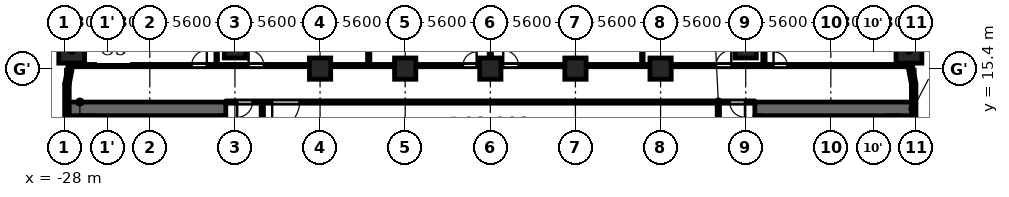
"""IFC4 building model, lengths in metres.
Left out: names, types, materials, properties, quantities, classifications, styles, units other than length and angle.
Written with IfcOpenShell. Run it as: python <this file> out.ifc"""

import sys

from ifc_helpers import new_model, si_unit, direction, frame, frame_2d, origin, origin_2d, place, context, subcontext, project, spatial, rectangle, extrude, element, fill, save


model = new_model("IFC4")
c1 = context("Model", 3, precision=1e-05, world=origin(), true_north=direction((0.0, 1.0)))
c2 = subcontext(c1, "Body", "Model", "MODEL_VIEW")
j1 = project(units=[si_unit("LENGTHUNIT", "METRE"), si_unit("PLANEANGLEUNIT", "RADIAN")], contexts=[c1])
p1 = place(None, origin())
s1 = spatial("IfcSite", under=j1, at=p1, CompositionType="ELEMENT")
p2 = place(p1, origin())
s2 = spatial("IfcBuilding", under=s1, at=p2, CompositionType="ELEMENT")
p3 = place(p2, frame((0.0, 0.0, 11.3)))
s3 = spatial("IfcBuildingStorey", under=s2, at=p3, CompositionType="ELEMENT", Elevation=11.3)
for number, where, z_axis, x_axis in (
    (1, (27.538, 16.609, 0.0), (0.0, 0.0, 1.0), (1.0, 0.0, 0.0)),
    (2, (-27.538, 16.609, 0.0), (0.0, 0.0, 1.0), (1.0, 0.0, 0.0)),
):
    element("IfcColumn", number, at=place(p3, frame(where, z_axis=z_axis, x_axis=x_axis)), inside=s3, PredefinedType="COLUMN", context=c2, shape_type="SweptSolid", body=[
        extrude(rectangle(XDim=1.7, YDim=1.7, at=origin_2d()), origin(), (0.0, 0.0, 1.0), 4.8),
    ])
for number, where, z_axis, x_axis in (
    (3, (-16.8, 16.8, 0.0), (0.0, 0.0, 1.0), (1.0, 0.0, 0.0)),
    (4, (16.8, 16.8, 0.0), (0.0, 0.0, 1.0), (1.0, 0.0, 0.0)),
    (5, (-11.2, 15.4, 0.0), (0.0, 0.0, 1.0), (1.0, 0.0, 0.0)),
    (6, (-5.6, 15.4, 0.0), (0.0, 0.0, 1.0), (1.0, 0.0, 0.0)),
    (7, (0.0, 15.4, 0.0), (0.0, 0.0, 1.0), (1.0, 0.0, 0.0)),
    (8, (5.6, 15.4, 0.0), (0.0, 0.0, 1.0), (1.0, 0.0, 0.0)),
    (9, (11.2, 15.4, 0.0), (0.0, 0.0, 1.0), (1.0, 0.0, 0.0)),
):
    element("IfcColumn", number, at=place(p3, frame(where, z_axis=z_axis, x_axis=x_axis)), inside=s3, PredefinedType="COLUMN", context=c2, shape_type="SweptSolid", body=[
        extrude(rectangle(XDim=1.4, YDim=1.4, at=origin_2d()), origin(), (0.0, 0.0, 1.0), 4.8),
    ])
p4 = place(p3, frame((27.85, 12.05, 0.0), z_axis=(0.0, 0.0, 1.0), x_axis=(0.0, 1.0, 0.0)))
e10 = element("IfcWall", 10, at=p4, inside=s3, PredefinedType="SOLIDWALL", context=c2, shape_type="SweptSolid", body=[
    extrude(rectangle(XDim=2.35, YDim=0.3, at=frame_2d((1.175, 0.0))), origin(), (0.0, 0.0, 1.0), 3.55),
])
for number, where, z_axis, x_axis in (
    (11, (27.853, 14.372, 0.0), (0.0, 0.0, 1.0), (-0.187, 0.982, 0.0)),
    (12, (-27.589, 15.753, 0.0), (0.0, 0.0, 1.0), (-0.187, -0.982, 0.0)),
):
    element("IfcWall", number, at=place(p3, frame(where, z_axis=z_axis, x_axis=x_axis)), inside=s3, PredefinedType="SOLIDWALL", context=c2, shape_type="SweptSolid", body=[
        extrude(rectangle(XDim=1.406, YDim=0.3, at=frame_2d((0.703, 0.0))), origin(), (0.0, 0.0, 1.0), 3.55),
    ])
p5 = place(p3, frame((-27.85, 14.4, 0.0), z_axis=(0.0, 0.0, 1.0), x_axis=(0.0, -1.0, 0.0)))
e13 = element("IfcWall", 13, at=p5, inside=s3, PredefinedType="SOLIDWALL", context=c2, shape_type="SweptSolid", body=[
    extrude(rectangle(XDim=2.35, YDim=0.3, at=frame_2d((1.175, 0.0))), origin(), (0.0, 0.0, 1.0), 3.55),
])
p6 = place(p3, frame((-17.4, 12.75, 0.0), z_axis=(0.0, 0.0, 1.0), x_axis=(-1.0, 0.0, 0.0)))
e14 = element("IfcWall", 14, at=p6, inside=s3, PredefinedType="SHEAR", context=c2, shape_type="SweptSolid", body=[
    extrude(rectangle(XDim=10.4, YDim=0.9, at=frame_2d((5.2, 0.0))), origin(), (0.0, 0.0, 1.0), 4.45),
])
p7 = place(p3, frame((-17.6, -12.3, 0.0), z_axis=(0.0, 0.0, 1.0), x_axis=(0.0, 1.0, 0.0)))
e15 = element("IfcWall", 15, at=p7, inside=s3, PredefinedType="SHEAR", context=c2, shape_type="SweptSolid", body=[
    extrude(rectangle(XDim=24.6, YDim=0.4, at=frame_2d((12.3, 0.0))), origin(), (0.0, 0.0, 1.0), 4.45),
])
p8 = place(p7, frame((6.0, 0.0, 0.0)))
e16 = element("IfcOpeningElement", 16, at=p8, cuts=e15, PredefinedType="OPENING", context=c2, shape_type="SweptSolid", body=[
    extrude(rectangle(XDim=1.1, YDim=2.1, at=frame_2d((0.55, 1.05))), frame((0.0, 0.21, 0.0), z_axis=(0.0, -1.0, 0.0), x_axis=(1.0, 0.0, 0.0)), (0.0, 0.0, 1.0), 0.42),
])
p9 = place(p7, frame((8.4, 0.0, 0.0)))
e17 = element("IfcOpeningElement", 17, at=p9, cuts=e15, PredefinedType="OPENING", context=c2, shape_type="SweptSolid", body=[
    extrude(rectangle(XDim=1.1, YDim=2.1, at=frame_2d((0.55, 1.05))), frame((0.0, 0.21, 0.0), z_axis=(0.0, -1.0, 0.0), x_axis=(1.0, 0.0, 0.0)), (0.0, 0.0, 1.0), 0.42),
])
p10 = place(p7, frame((10.8, 0.0, 0.0)))
e18 = element("IfcOpeningElement", 18, at=p10, cuts=e15, PredefinedType="OPENING", context=c2, shape_type="SweptSolid", body=[
    extrude(rectangle(XDim=1.1, YDim=2.1, at=frame_2d((0.55, 1.05))), frame((0.0, 0.21, 0.0), z_axis=(0.0, -1.0, 0.0), x_axis=(1.0, 0.0, 0.0)), (0.0, 0.0, 1.0), 0.42),
])
p11 = place(p7, frame((16.75, 0.0, 0.0)))
e19 = element("IfcOpeningElement", 19, at=p11, cuts=e15, PredefinedType="OPENING", context=c2, shape_type="SweptSolid", body=[
    extrude(rectangle(XDim=0.9, YDim=2.1, at=frame_2d((0.45, 1.05))), frame((0.0, 0.21, 0.0), z_axis=(0.0, -1.0, 0.0), x_axis=(1.0, 0.0, 0.0)), (0.0, 0.0, 1.0), 0.42),
])
p12 = place(p7, frame((22.8, 0.0, 0.0)))
e20 = element("IfcOpeningElement", 20, at=p12, cuts=e15, PredefinedType="OPENING", context=c2, shape_type="SweptSolid", body=[
    extrude(rectangle(XDim=1.1, YDim=2.1, at=frame_2d((0.55, 1.05))), frame((0.0, 0.21, 0.0), z_axis=(0.0, -1.0, 0.0), x_axis=(1.0, 0.0, 0.0)), (0.0, 0.0, 1.0), 0.42),
])
p13 = place(p7, frame((0.7, 0.0, 0.0)))
e21 = element("IfcOpeningElement", 21, at=p13, cuts=e15, PredefinedType="OPENING", context=c2, shape_type="SweptSolid", body=[
    extrude(rectangle(XDim=1.1, YDim=2.1, at=frame_2d((0.55, 1.05))), frame((0.0, 0.21, 0.0), z_axis=(0.0, -1.0, 0.0), x_axis=(1.0, 0.0, 0.0)), (0.0, 0.0, 1.0), 0.42),
])
p14 = place(p7, frame((12.775, 0.0, 0.0)))
e22 = element("IfcOpeningElement", 22, at=p14, cuts=e15, PredefinedType="OPENING", context=c2, shape_type="SweptSolid", body=[
    extrude(rectangle(XDim=1.8, YDim=2.1, at=frame_2d((0.9, 1.05))), frame((0.0, 0.21, 0.0), z_axis=(0.0, -1.0, 0.0), x_axis=(1.0, 0.0, 0.0)), (0.0, 0.0, 1.0), 0.42),
])
p15 = place(p3, frame((-26.55, -12.3, 0.0), z_axis=(0.0, 0.0, 1.0), x_axis=(0.0, 1.0, 0.0)))
e23 = element("IfcWall", 23, at=p15, inside=s3, PredefinedType="SHEAR", context=c2, shape_type="SweptSolid", body=[
    extrude(rectangle(XDim=24.6, YDim=0.9, at=frame_2d((12.3, 0.0))), origin(), (0.0, 0.0, 1.0), 4.45),
])
p16 = place(p3, frame((-23.55, 9.8, 0.0), z_axis=(0.0, 0.0, 1.0), x_axis=(0.0, 1.0, 0.0)))
e24 = element("IfcWall", 24, at=p16, inside=s3, PredefinedType="PARTITIONING", context=c2, shape_type="SweptSolid", body=[
    extrude(rectangle(XDim=2.5, YDim=0.2, at=frame_2d((1.25, 0.0))), origin(), (0.0, 0.0, 1.0), 4.45),
])
p17 = place(p16, frame((0.8, 0.0, 0.0)))
e25 = element("IfcOpeningElement", 25, at=p17, cuts=e24, PredefinedType="OPENING", context=c2, shape_type="SweptSolid", body=[
    extrude(rectangle(XDim=0.9, YDim=2.1, at=frame_2d((0.45, 1.05))), frame((0.0, 0.11, 0.0), z_axis=(0.0, -1.0, 0.0), x_axis=(1.0, 0.0, 0.0)), (0.0, 0.0, 1.0), 0.22),
])
p18 = place(p3, frame((17.4, 12.75, 0.0), z_axis=(0.0, 0.0, 1.0), x_axis=(1.0, 0.0, 0.0)))
e26 = element("IfcWall", 26, at=p18, inside=s3, PredefinedType="SHEAR", context=c2, shape_type="SweptSolid", body=[
    extrude(rectangle(XDim=10.4, YDim=0.9, at=frame_2d((5.2, 0.0))), origin(), (0.0, 0.0, 1.0), 4.45),
])
p19 = place(p3, frame((17.6, -12.3, 0.0), z_axis=(0.0, 0.0, 1.0), x_axis=(0.0, 1.0, 0.0)))
e27 = element("IfcWall", 27, at=p19, inside=s3, PredefinedType="SHEAR", context=c2, shape_type="SweptSolid", body=[
    extrude(rectangle(XDim=24.6, YDim=0.4, at=frame_2d((12.3, 0.0))), origin(), (0.0, 0.0, 1.0), 4.45),
])
p20 = place(p19, frame((6.0, 0.0, 0.0)))
e28 = element("IfcOpeningElement", 28, at=p20, cuts=e27, PredefinedType="OPENING", context=c2, shape_type="SweptSolid", body=[
    extrude(rectangle(XDim=1.1, YDim=2.1, at=frame_2d((0.55, 1.05))), frame((0.0, 0.21, 0.0), z_axis=(0.0, -1.0, 0.0), x_axis=(1.0, 0.0, 0.0)), (0.0, 0.0, 1.0), 0.42),
])
p21 = place(p19, frame((8.4, 0.0, 0.0)))
e29 = element("IfcOpeningElement", 29, at=p21, cuts=e27, PredefinedType="OPENING", context=c2, shape_type="SweptSolid", body=[
    extrude(rectangle(XDim=1.1, YDim=2.1, at=frame_2d((0.55, 1.05))), frame((0.0, 0.21, 0.0), z_axis=(0.0, -1.0, 0.0), x_axis=(1.0, 0.0, 0.0)), (0.0, 0.0, 1.0), 0.42),
])
p22 = place(p19, frame((10.8, 0.0, 0.0)))
e30 = element("IfcOpeningElement", 30, at=p22, cuts=e27, PredefinedType="OPENING", context=c2, shape_type="SweptSolid", body=[
    extrude(rectangle(XDim=1.1, YDim=2.1, at=frame_2d((0.55, 1.05))), frame((0.0, 0.21, 0.0), z_axis=(0.0, -1.0, 0.0), x_axis=(1.0, 0.0, 0.0)), (0.0, 0.0, 1.0), 0.42),
])
p23 = place(p19, frame((16.75, 0.0, 0.0)))
e31 = element("IfcOpeningElement", 31, at=p23, cuts=e27, PredefinedType="OPENING", context=c2, shape_type="SweptSolid", body=[
    extrude(rectangle(XDim=0.9, YDim=2.1, at=frame_2d((0.45, 1.05))), frame((0.0, 0.21, 0.0), z_axis=(0.0, -1.0, 0.0), x_axis=(1.0, 0.0, 0.0)), (0.0, 0.0, 1.0), 0.42),
])
p24 = place(p19, frame((22.8, 0.0, 0.0)))
e32 = element("IfcOpeningElement", 32, at=p24, cuts=e27, PredefinedType="OPENING", context=c2, shape_type="SweptSolid", body=[
    extrude(rectangle(XDim=1.1, YDim=2.1, at=frame_2d((0.55, 1.05))), frame((0.0, 0.21, 0.0), z_axis=(0.0, -1.0, 0.0), x_axis=(1.0, 0.0, 0.0)), (0.0, 0.0, 1.0), 0.42),
])
p25 = place(p19, frame((0.7, 0.0, 0.0)))
e33 = element("IfcOpeningElement", 33, at=p25, cuts=e27, PredefinedType="OPENING", context=c2, shape_type="SweptSolid", body=[
    extrude(rectangle(XDim=1.1, YDim=2.1, at=frame_2d((0.55, 1.05))), frame((0.0, 0.21, 0.0), z_axis=(0.0, -1.0, 0.0), x_axis=(1.0, 0.0, 0.0)), (0.0, 0.0, 1.0), 0.42),
])
p26 = place(p19, frame((12.775, 0.0, 0.0)))
e34 = element("IfcOpeningElement", 34, at=p26, cuts=e27, PredefinedType="OPENING", context=c2, shape_type="SweptSolid", body=[
    extrude(rectangle(XDim=1.8, YDim=2.1, at=frame_2d((0.9, 1.05))), frame((0.0, 0.21, 0.0), z_axis=(0.0, -1.0, 0.0), x_axis=(1.0, 0.0, 0.0)), (0.0, 0.0, 1.0), 0.42),
])
p27 = place(p3, frame((26.55, -12.3, 0.0), z_axis=(0.0, 0.0, 1.0), x_axis=(0.0, 1.0, 0.0)))
e35 = element("IfcWall", 35, at=p27, inside=s3, PredefinedType="SHEAR", context=c2, shape_type="SweptSolid", body=[
    extrude(rectangle(XDim=24.6, YDim=0.9, at=frame_2d((12.3, 0.0))), origin(), (0.0, 0.0, 1.0), 4.45),
])
p28 = place(p3, frame((23.55, 9.8, 0.0), z_axis=(0.0, 0.0, 1.0), x_axis=(0.0, 1.0, 0.0)))
e36 = element("IfcWall", 36, at=p28, inside=s3, PredefinedType="PARTITIONING", context=c2, shape_type="SweptSolid", body=[
    extrude(rectangle(XDim=2.5, YDim=0.2, at=frame_2d((1.25, 0.0))), origin(), (0.0, 0.0, 1.0), 4.45),
])
p29 = place(p28, frame((0.8, 0.0, 0.0)))
e37 = element("IfcOpeningElement", 37, at=p29, cuts=e36, PredefinedType="OPENING", context=c2, shape_type="SweptSolid", body=[
    extrude(rectangle(XDim=0.9, YDim=2.1, at=frame_2d((0.45, 1.05))), frame((0.0, 0.11, 0.0), z_axis=(0.0, -1.0, 0.0), x_axis=(1.0, 0.0, 0.0)), (0.0, 0.0, 1.0), 0.22),
])
p30 = place(p3, frame((-17.4, 13.2, 0.0), z_axis=(0.0, 0.0, 1.0), x_axis=(1.0, 0.0, 0.0)))
e38 = element("IfcWall", 38, at=p30, inside=s3, PredefinedType="PARTITIONING", context=c2, shape_type="SweptSolid", body=[
    extrude(rectangle(XDim=34.8, YDim=0.15, at=frame_2d((17.4, 0.0))), origin(), (0.0, 0.0, 1.0), 4.45),
])
p31 = place(p30, frame((3.05, 0.0, 0.0)))
e39 = element("IfcOpeningElement", 39, at=p31, cuts=e38, PredefinedType="OPENING", context=c2, shape_type="SweptSolid", body=[
    extrude(rectangle(XDim=1.8, YDim=2.1, at=frame_2d((0.9, 1.05))), frame((0.0, 0.085, 0.0), z_axis=(0.0, -1.0, 0.0), x_axis=(1.0, 0.0, 0.0)), (0.0, 0.0, 1.0), 0.17),
])
p32 = place(p30, frame((0.75, 0.0, 0.0)))
e40 = element("IfcOpeningElement", 40, at=p32, cuts=e38, PredefinedType="OPENING", context=c2, shape_type="SweptSolid", body=[
    extrude(rectangle(XDim=1.0, YDim=2.1, at=frame_2d((0.5, 1.05))), frame((0.0, 0.085, 0.0), z_axis=(0.0, -1.0, 0.0), x_axis=(1.0, 0.0, 0.0)), (0.0, 0.0, 1.0), 0.17),
])
p33 = place(p30, frame((33.15, 0.0, 0.0)))
e41 = element("IfcOpeningElement", 41, at=p33, cuts=e38, PredefinedType="OPENING", context=c2, shape_type="SweptSolid", body=[
    extrude(rectangle(XDim=1.0, YDim=2.1, at=frame_2d((0.5, 1.05))), frame((0.0, 0.085, 0.0), z_axis=(0.0, -1.0, 0.0), x_axis=(1.0, 0.0, 0.0)), (0.0, 0.0, 1.0), 0.17),
])
p34 = place(p3, frame((-27.446, 15.6, 0.0), z_axis=(0.0, 0.0, 1.0), x_axis=(1.0, 0.0, 0.0)))
e42 = element("IfcWall", 42, at=p34, inside=s3, PredefinedType="PARTITIONING", context=c2, shape_type="SweptSolid", body=[
    extrude(rectangle(XDim=54.892, YDim=0.15, at=frame_2d((27.446, 0.0))), origin(), (0.0, 0.0, 1.0), 4.45),
])
p35 = place(p34, frame((7.796, 0.0, 0.0)))
e43 = element("IfcOpeningElement", 43, at=p35, cuts=e42, PredefinedType="OPENING", context=c2, shape_type="SweptSolid", body=[
    extrude(rectangle(XDim=1.0, YDim=2.1, at=frame_2d((0.5, 1.05))), frame((0.0, 0.085, 0.0), z_axis=(0.0, -1.0, 0.0), x_axis=(1.0, 0.0, 0.0)), (0.0, 0.0, 1.0), 0.17),
])
p36 = place(p34, frame((11.546, 0.0, 0.0)))
e44 = element("IfcOpeningElement", 44, at=p36, cuts=e42, PredefinedType="OPENING", context=c2, shape_type="SweptSolid", body=[
    extrude(rectangle(XDim=1.0, YDim=2.1, at=frame_2d((0.5, 1.05))), frame((0.0, 0.085, 0.0), z_axis=(0.0, -1.0, 0.0), x_axis=(1.0, 0.0, 0.0)), (0.0, 0.0, 1.0), 0.17),
])
p37 = place(p34, frame((25.646, 0.0, 0.0)))
e45 = element("IfcOpeningElement", 45, at=p37, cuts=e42, PredefinedType="OPENING", context=c2, shape_type="SweptSolid", body=[
    extrude(rectangle(XDim=0.9, YDim=2.1, at=frame_2d((0.45, 1.05))), frame((0.0, 0.085, 0.0), z_axis=(0.0, -1.0, 0.0), x_axis=(1.0, 0.0, 0.0)), (0.0, 0.0, 1.0), 0.17),
])
p38 = place(p34, frame((28.296, 0.0, 0.0)))
e46 = element("IfcOpeningElement", 46, at=p38, cuts=e42, PredefinedType="OPENING", context=c2, shape_type="SweptSolid", body=[
    extrude(rectangle(XDim=1.0, YDim=2.1, at=frame_2d((0.5, 1.05))), frame((0.0, 0.085, 0.0), z_axis=(0.0, -1.0, 0.0), x_axis=(1.0, 0.0, 0.0)), (0.0, 0.0, 1.0), 0.17),
])
p39 = place(p34, frame((42.296, 0.0, 0.0)))
e47 = element("IfcOpeningElement", 47, at=p39, cuts=e42, PredefinedType="OPENING", context=c2, shape_type="SweptSolid", body=[
    extrude(rectangle(XDim=1.0, YDim=2.1, at=frame_2d((0.5, 1.05))), frame((0.0, 0.085, 0.0), z_axis=(0.0, -1.0, 0.0), x_axis=(1.0, 0.0, 0.0)), (0.0, 0.0, 1.0), 0.17),
])
p40 = place(p34, frame((46.075, 0.0, 0.0)))
e48 = element("IfcOpeningElement", 48, at=p40, cuts=e42, PredefinedType="OPENING", context=c2, shape_type="SweptSolid", body=[
    extrude(rectangle(XDim=0.9, YDim=2.1, at=frame_2d((0.45, 1.05))), frame((0.0, 0.085, 0.0), z_axis=(0.0, -1.0, 0.0), x_axis=(1.0, 0.0, 0.0)), (0.0, 0.0, 1.0), 0.17),
])
p41 = place(p3, frame((-18.0, 15.675, 0.0), z_axis=(0.0, 0.0, 1.0), x_axis=(0.0, 1.0, 0.0)))
e49 = element("IfcWall", 49, at=p41, inside=s3, PredefinedType="PARTITIONING", context=c2, shape_type="SweptSolid", body=[
    extrude(rectangle(XDim=6.405, YDim=0.1, at=frame_2d((3.203, 0.0))), origin(), (0.0, 0.0, 1.0), 4.45),
])
p42 = place(p3, frame((-15.0, 6.769, 0.0), z_axis=(0.0, 0.0, 1.0), x_axis=(0.0, 1.0, 0.0)))
e50 = element("IfcWall", 50, at=p42, inside=s3, PredefinedType="PARTITIONING", context=c2, shape_type="SweptSolid", body=[
    extrude(rectangle(XDim=6.356, YDim=0.15, at=frame_2d((3.178, 0.0))), origin(), (0.0, 0.0, 1.0), 4.45),
])
p43 = place(p3, frame((-8.0, 15.675, 0.0), z_axis=(0.0, 0.0, 1.0), x_axis=(0.0, 1.0, 0.0)))
e51 = element("IfcWall", 51, at=p43, inside=s3, PredefinedType="PARTITIONING", context=c2, shape_type="SweptSolid", body=[
    extrude(rectangle(XDim=6.405, YDim=0.15, at=frame_2d((3.203, 0.0))), origin(), (0.0, 0.0, 1.0), 4.45),
])
p44 = place(p3, frame((0.0, 15.675, 0.0), z_axis=(0.0, 0.0, 1.0), x_axis=(0.0, 1.0, 0.0)))
e52 = element("IfcWall", 52, at=p44, inside=s3, PredefinedType="PARTITIONING", context=c2, shape_type="SweptSolid", body=[
    extrude(rectangle(XDim=6.635, YDim=0.15, at=frame_2d((3.317, 0.0))), origin(), (0.0, 0.0, 1.0), 4.45),
])
p45 = place(p3, frame((10.0, 15.675, 0.0), z_axis=(0.0, 0.0, 1.0), x_axis=(0.0, 1.0, 0.0)))
e53 = element("IfcWall", 53, at=p45, inside=s3, PredefinedType="PARTITIONING", context=c2, shape_type="SweptSolid", body=[
    extrude(rectangle(XDim=6.405, YDim=0.1, at=frame_2d((3.203, 0.0))), origin(), (0.0, 0.0, 1.0), 4.45),
])
p46 = place(p3, frame((15.0, 6.769, 0.0), z_axis=(0.0, 0.0, 1.0), x_axis=(0.0, 1.0, 0.0)))
e54 = element("IfcWall", 54, at=p46, inside=s3, PredefinedType="PARTITIONING", context=c2, shape_type="SweptSolid", body=[
    extrude(rectangle(XDim=6.356, YDim=0.15, at=frame_2d((3.178, 0.0))), origin(), (0.0, 0.0, 1.0), 4.45),
])
p47 = place(p3, frame((18.0, 15.675, 0.0), z_axis=(0.0, 0.0, 1.0), x_axis=(0.0, 1.0, 0.0)))
e55 = element("IfcWall", 55, at=p47, inside=s3, PredefinedType="PARTITIONING", context=c2, shape_type="SweptSolid", body=[
    extrude(rectangle(XDim=6.405, YDim=0.15, at=frame_2d((3.203, 0.0))), origin(), (0.0, 0.0, 1.0), 4.45),
])
p48 = place(p31, origin())
e56 = element("IfcDoor", 56, at=p48, inside=s3, OperationType="SINGLE_SWING_LEFT", PredefinedType="DOOR", context=c2, shape_type="SweptSolid", body=[
    extrude(rectangle(XDim=1.8, YDim=2.1, at=frame_2d((0.9, 1.05))), frame((0.0, 0.025, 0.0), z_axis=(0.0, -1.0, 0.0), x_axis=(1.0, 0.0, 0.0)), (0.0, 0.0, 1.0), 0.05),
])
fill(e39, e56)
p49 = place(p32, origin())
e57 = element("IfcDoor", 57, at=p49, inside=s3, OperationType="SINGLE_SWING_LEFT", PredefinedType="DOOR", context=c2, shape_type="SweptSolid", body=[
    extrude(rectangle(XDim=1.0, YDim=2.1, at=frame_2d((0.5, 1.05))), frame((0.0, 0.025, 0.0), z_axis=(0.0, -1.0, 0.0), x_axis=(1.0, 0.0, 0.0)), (0.0, 0.0, 1.0), 0.05),
])
fill(e40, e57)
p50 = place(p33, origin())
e58 = element("IfcDoor", 58, at=p50, inside=s3, OperationType="SINGLE_SWING_RIGHT", PredefinedType="DOOR", context=c2, shape_type="SweptSolid", body=[
    extrude(rectangle(XDim=1.0, YDim=2.1, at=frame_2d((0.5, 1.05))), frame((0.0, 0.025, 0.0), z_axis=(0.0, -1.0, 0.0), x_axis=(1.0, 0.0, 0.0)), (0.0, 0.0, 1.0), 0.05),
])
fill(e41, e58)
p51 = place(p35, origin())
e59 = element("IfcDoor", 59, at=p51, inside=s3, OperationType="SINGLE_SWING_LEFT", PredefinedType="DOOR", context=c2, shape_type="SweptSolid", body=[
    extrude(rectangle(XDim=1.0, YDim=2.1, at=frame_2d((0.5, 1.05))), frame((0.0, 0.025, 0.0), z_axis=(0.0, -1.0, 0.0), x_axis=(1.0, 0.0, 0.0)), (0.0, 0.0, 1.0), 0.05),
])
fill(e43, e59)
p52 = place(p36, origin())
e60 = element("IfcDoor", 60, at=p52, inside=s3, OperationType="SINGLE_SWING_RIGHT", PredefinedType="DOOR", context=c2, shape_type="SweptSolid", body=[
    extrude(rectangle(XDim=1.0, YDim=2.1, at=frame_2d((0.5, 1.05))), frame((0.0, 0.025, 0.0), z_axis=(0.0, -1.0, 0.0), x_axis=(1.0, 0.0, 0.0)), (0.0, 0.0, 1.0), 0.05),
])
fill(e44, e60)
p53 = place(p37, origin())
e61 = element("IfcDoor", 61, at=p53, inside=s3, OperationType="SINGLE_SWING_LEFT", PredefinedType="DOOR", context=c2, shape_type="SweptSolid", body=[
    extrude(rectangle(XDim=0.9, YDim=2.1, at=frame_2d((0.45, 1.05))), frame((0.0, 0.025, 0.0), z_axis=(0.0, -1.0, 0.0), x_axis=(1.0, 0.0, 0.0)), (0.0, 0.0, 1.0), 0.05),
])
fill(e45, e61)
p54 = place(p38, origin())
e62 = element("IfcDoor", 62, at=p54, inside=s3, OperationType="SINGLE_SWING_RIGHT", PredefinedType="DOOR", context=c2, shape_type="SweptSolid", body=[
    extrude(rectangle(XDim=1.0, YDim=2.1, at=frame_2d((0.5, 1.05))), frame((0.0, 0.025, 0.0), z_axis=(0.0, -1.0, 0.0), x_axis=(1.0, 0.0, 0.0)), (0.0, 0.0, 1.0), 0.05),
])
fill(e46, e62)
p55 = place(p39, origin())
e63 = element("IfcDoor", 63, at=p55, inside=s3, OperationType="SINGLE_SWING_LEFT", PredefinedType="DOOR", context=c2, shape_type="SweptSolid", body=[
    extrude(rectangle(XDim=1.0, YDim=2.1, at=frame_2d((0.5, 1.05))), frame((0.0, 0.025, 0.0), z_axis=(0.0, -1.0, 0.0), x_axis=(1.0, 0.0, 0.0)), (0.0, 0.0, 1.0), 0.05),
])
fill(e47, e63)
p56 = place(p40, origin())
e64 = element("IfcDoor", 64, at=p56, inside=s3, OperationType="SINGLE_SWING_RIGHT", PredefinedType="DOOR", context=c2, shape_type="SweptSolid", body=[
    extrude(rectangle(XDim=0.9, YDim=2.1, at=frame_2d((0.45, 1.05))), frame((0.0, 0.025, 0.0), z_axis=(0.0, -1.0, 0.0), x_axis=(1.0, 0.0, 0.0)), (0.0, 0.0, 1.0), 0.05),
])
fill(e48, e64)
save(model, sys.argv[1])
